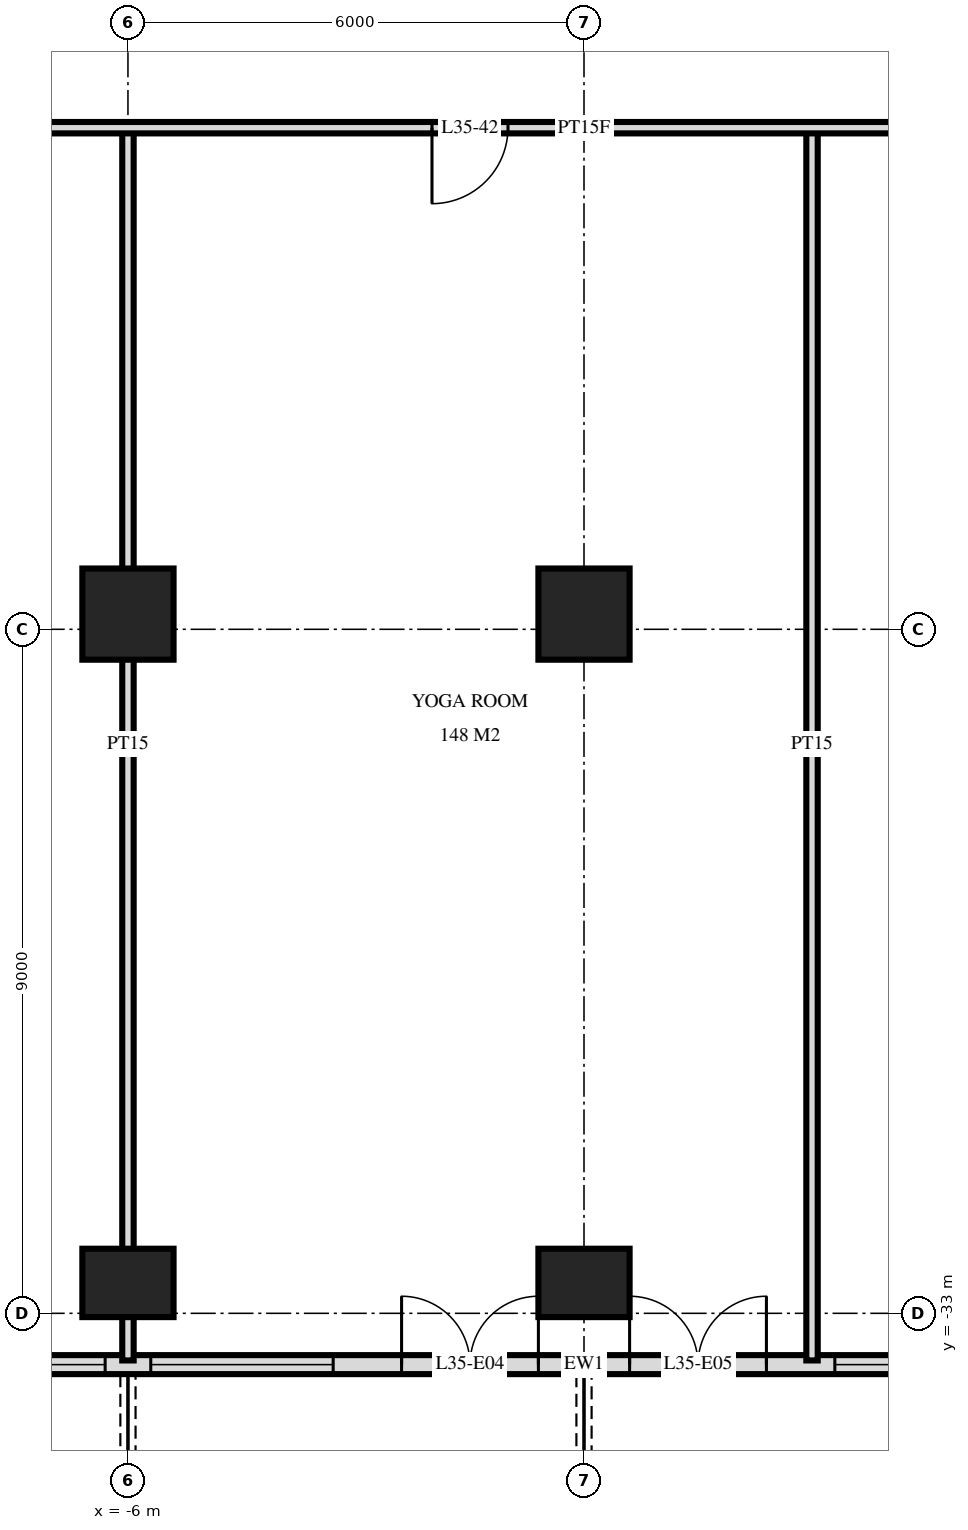
"""IFC4 building model, lengths in metres.
Left out: names, types, materials, properties, quantities, classifications, styles, units other than length and angle.
Written with IfcOpenShell. Run it as: python <this file> out.ifc"""

import sys

from ifc_helpers import new_model, si_unit, direction, frame, frame_2d, origin, origin_2d, place, context, subcontext, project, spatial, rectangle, extrude, element, fill, save


model = new_model("IFC4")
c1 = context("Model", 3, precision=1e-05, world=origin(), true_north=direction((0.0, 1.0)))
c2 = subcontext(c1, "Body", "Model", "MODEL_VIEW")
j1 = project(units=[si_unit("LENGTHUNIT", "METRE"), si_unit("PLANEANGLEUNIT", "RADIAN")], contexts=[c1])
p1 = place(None, origin())
s1 = spatial("IfcSite", under=j1, at=p1, CompositionType="ELEMENT")
p2 = place(p1, origin())
s2 = spatial("IfcBuilding", under=s1, at=p2, CompositionType="ELEMENT")
p3 = place(p2, frame((0.0, 0.0, 138.0)))
s3 = spatial("IfcBuildingStorey", under=s2, at=p3, CompositionType="ELEMENT", Elevation=138.0)
p4 = place(p3, frame((-6.0, -32.6, 0.0), z_axis=(0.0, 0.0, 1.0), x_axis=(1.0, 0.0, 0.0)))
e1 = element("IfcColumn", 1, at=p4, inside=s3, PredefinedType="COLUMN", context=c2, shape_type="SweptSolid", body=[
    extrude(rectangle(XDim=1.2, YDim=0.9, at=origin_2d()), origin(), (0.0, 0.0, 1.0), 3.6),
])
p5 = place(p3, frame((-6.0, -23.8, 0.0), z_axis=(0.0, 0.0, 1.0), x_axis=(1.0, 0.0, 0.0)))
e2 = element("IfcColumn", 2, at=p5, inside=s3, PredefinedType="COLUMN", context=c2, shape_type="SweptSolid", body=[
    extrude(rectangle(XDim=1.2, YDim=1.2, at=origin_2d()), origin(), (0.0, 0.0, 1.0), 3.6),
])
p6 = place(p3, frame((0.0, -32.6, 0.0), z_axis=(0.0, 0.0, 1.0), x_axis=(1.0, 0.0, 0.0)))
e3 = element("IfcColumn", 3, at=p6, inside=s3, PredefinedType="COLUMN", context=c2, shape_type="SweptSolid", body=[
    extrude(rectangle(XDim=1.2, YDim=0.9, at=origin_2d()), origin(), (0.0, 0.0, 1.0), 3.6),
])
p7 = place(p3, frame((0.0, -23.8, 0.0), z_axis=(0.0, 0.0, 1.0), x_axis=(1.0, 0.0, 0.0)))
e4 = element("IfcColumn", 4, at=p7, inside=s3, PredefinedType="COLUMN", context=c2, shape_type="SweptSolid", body=[
    extrude(rectangle(XDim=1.2, YDim=1.2, at=origin_2d()), origin(), (0.0, 0.0, 1.0), 3.6),
])
p8 = place(p3, frame((-23.675, -33.675, 0.0), z_axis=(0.0, 0.0, 1.0), x_axis=(1.0, 0.0, 0.0)))
e5 = element("IfcWall", 5, at=p8, inside=s3, PredefinedType="SOLIDWALL", context=c2, shape_type="SweptSolid", body=[
    extrude(rectangle(XDim=47.351, YDim=0.25, at=frame_2d((23.675, 0.0))), origin(), (0.0, 0.0, 1.0), 3.32),
])
p9 = place(p8, frame((0.575, 0.0, 0.0)))
e6 = element("IfcOpeningElement", 6, at=p9, cuts=e5, PredefinedType="OPENING", context=c2, shape_type="SweptSolid", body=[
    extrude(rectangle(XDim=1.8, YDim=2.4, at=frame_2d((0.9, 1.2))), frame((0.0, 0.135, 0.0), z_axis=(0.0, -1.0, 0.0), x_axis=(1.0, 0.0, 0.0)), (0.0, 0.0, 1.0), 0.27),
])
p10 = place(p8, frame((3.425, 0.0, 0.3)))
e7 = element("IfcOpeningElement", 7, at=p10, cuts=e5, PredefinedType="OPENING", context=c2, shape_type="SweptSolid", body=[
    extrude(rectangle(XDim=1.8, YDim=2.1, at=frame_2d((0.9, 1.05))), frame((0.0, 0.135, 0.0), z_axis=(0.0, -1.0, 0.0), x_axis=(1.0, 0.0, 0.0)), (0.0, 0.0, 1.0), 0.27),
])
p11 = place(p8, frame((5.975, 0.0, 0.3)))
e8 = element("IfcOpeningElement", 8, at=p11, cuts=e5, PredefinedType="OPENING", context=c2, shape_type="SweptSolid", body=[
    extrude(rectangle(XDim=2.4, YDim=2.1, at=frame_2d((1.2, 1.05))), frame((0.0, 0.135, 0.0), z_axis=(0.0, -1.0, 0.0), x_axis=(1.0, 0.0, 0.0)), (0.0, 0.0, 1.0), 0.27),
])
p12 = place(p8, frame((9.275, 0.0, 0.0)))
e9 = element("IfcOpeningElement", 9, at=p12, cuts=e5, PredefinedType="OPENING", context=c2, shape_type="SweptSolid", body=[
    extrude(rectangle(XDim=1.8, YDim=2.4, at=frame_2d((0.9, 1.2))), frame((0.0, 0.135, 0.0), z_axis=(0.0, -1.0, 0.0), x_axis=(1.0, 0.0, 0.0)), (0.0, 0.0, 1.0), 0.27),
])
p13 = place(p8, frame((12.275, 0.0, 0.0)))
e10 = element("IfcOpeningElement", 10, at=p13, cuts=e5, PredefinedType="OPENING", context=c2, shape_type="SweptSolid", body=[
    extrude(rectangle(XDim=1.8, YDim=2.4, at=frame_2d((0.9, 1.2))), frame((0.0, 0.135, 0.0), z_axis=(0.0, -1.0, 0.0), x_axis=(1.0, 0.0, 0.0)), (0.0, 0.0, 1.0), 0.27),
])
p14 = place(p8, frame((14.975, 0.0, 0.3)))
e11 = element("IfcOpeningElement", 11, at=p14, cuts=e5, PredefinedType="OPENING", context=c2, shape_type="SweptSolid", body=[
    extrude(rectangle(XDim=2.4, YDim=2.1, at=frame_2d((1.2, 1.05))), frame((0.0, 0.135, 0.0), z_axis=(0.0, -1.0, 0.0), x_axis=(1.0, 0.0, 0.0)), (0.0, 0.0, 1.0), 0.27),
])
p15 = place(p8, frame((17.975, 0.0, 0.3)))
e12 = element("IfcOpeningElement", 12, at=p15, cuts=e5, PredefinedType="OPENING", context=c2, shape_type="SweptSolid", body=[
    extrude(rectangle(XDim=2.4, YDim=2.1, at=frame_2d((1.2, 1.05))), frame((0.0, 0.135, 0.0), z_axis=(0.0, -1.0, 0.0), x_axis=(1.0, 0.0, 0.0)), (0.0, 0.0, 1.0), 0.27),
])
p16 = place(p8, frame((21.275, 0.0, 0.0)))
e13 = element("IfcOpeningElement", 13, at=p16, cuts=e5, PredefinedType="OPENING", context=c2, shape_type="SweptSolid", body=[
    extrude(rectangle(XDim=1.8, YDim=2.4, at=frame_2d((0.9, 1.2))), frame((0.0, 0.135, 0.0), z_axis=(0.0, -1.0, 0.0), x_axis=(1.0, 0.0, 0.0)), (0.0, 0.0, 1.0), 0.27),
])
p17 = place(p8, frame((24.275, 0.0, 0.0)))
e14 = element("IfcOpeningElement", 14, at=p17, cuts=e5, PredefinedType="OPENING", context=c2, shape_type="SweptSolid", body=[
    extrude(rectangle(XDim=1.8, YDim=2.4, at=frame_2d((0.9, 1.2))), frame((0.0, 0.135, 0.0), z_axis=(0.0, -1.0, 0.0), x_axis=(1.0, 0.0, 0.0)), (0.0, 0.0, 1.0), 0.27),
])
p18 = place(p8, frame((26.975, 0.0, 0.3)))
e15 = element("IfcOpeningElement", 15, at=p18, cuts=e5, PredefinedType="OPENING", context=c2, shape_type="SweptSolid", body=[
    extrude(rectangle(XDim=2.4, YDim=2.1, at=frame_2d((1.2, 1.05))), frame((0.0, 0.135, 0.0), z_axis=(0.0, -1.0, 0.0), x_axis=(1.0, 0.0, 0.0)), (0.0, 0.0, 1.0), 0.27),
])
p19 = place(p8, frame((30.275, 0.0, 0.0)))
e16 = element("IfcOpeningElement", 16, at=p19, cuts=e5, PredefinedType="OPENING", context=c2, shape_type="SweptSolid", body=[
    extrude(rectangle(XDim=1.8, YDim=2.4, at=frame_2d((0.9, 1.2))), frame((0.0, 0.135, 0.0), z_axis=(0.0, -1.0, 0.0), x_axis=(1.0, 0.0, 0.0)), (0.0, 0.0, 1.0), 0.27),
])
p20 = place(p8, frame((32.975, 0.0, 0.3)))
e17 = element("IfcOpeningElement", 17, at=p20, cuts=e5, PredefinedType="OPENING", context=c2, shape_type="SweptSolid", body=[
    extrude(rectangle(XDim=2.4, YDim=2.1, at=frame_2d((1.2, 1.05))), frame((0.0, 0.135, 0.0), z_axis=(0.0, -1.0, 0.0), x_axis=(1.0, 0.0, 0.0)), (0.0, 0.0, 1.0), 0.27),
])
p21 = place(p8, frame((36.275, 0.0, 0.0)))
e18 = element("IfcOpeningElement", 18, at=p21, cuts=e5, PredefinedType="OPENING", context=c2, shape_type="SweptSolid", body=[
    extrude(rectangle(XDim=1.8, YDim=2.4, at=frame_2d((0.9, 1.2))), frame((0.0, 0.135, 0.0), z_axis=(0.0, -1.0, 0.0), x_axis=(1.0, 0.0, 0.0)), (0.0, 0.0, 1.0), 0.27),
])
p22 = place(p8, frame((38.975, 0.0, 0.3)))
e19 = element("IfcOpeningElement", 19, at=p22, cuts=e5, PredefinedType="OPENING", context=c2, shape_type="SweptSolid", body=[
    extrude(rectangle(XDim=2.4, YDim=2.1, at=frame_2d((1.2, 1.05))), frame((0.0, 0.135, 0.0), z_axis=(0.0, -1.0, 0.0), x_axis=(1.0, 0.0, 0.0)), (0.0, 0.0, 1.0), 0.27),
])
p23 = place(p8, frame((42.275, 0.0, 0.0)))
e20 = element("IfcOpeningElement", 20, at=p23, cuts=e5, PredefinedType="OPENING", context=c2, shape_type="SweptSolid", body=[
    extrude(rectangle(XDim=1.8, YDim=2.4, at=frame_2d((0.9, 1.2))), frame((0.0, 0.135, 0.0), z_axis=(0.0, -1.0, 0.0), x_axis=(1.0, 0.0, 0.0)), (0.0, 0.0, 1.0), 0.27),
])
p24 = place(p8, frame((45.125, 0.0, 0.3)))
e21 = element("IfcOpeningElement", 21, at=p24, cuts=e5, PredefinedType="OPENING", context=c2, shape_type="SweptSolid", body=[
    extrude(rectangle(XDim=1.8, YDim=2.1, at=frame_2d((0.9, 1.05))), frame((0.0, 0.135, 0.0), z_axis=(0.0, -1.0, 0.0), x_axis=(1.0, 0.0, 0.0)), (0.0, 0.0, 1.0), 0.27),
])
for number, where, z_axis, x_axis in (
    (22, (3.0, -33.62, 0.0), (0.0, 0.0, 1.0), (0.0, 1.0, 0.0)),
    (23, (-6.0, -33.62, 0.0), (0.0, 0.0, 1.0), (0.0, 1.0, 0.0)),
):
    element("IfcWall", number, at=place(p3, frame(where, z_axis=z_axis, x_axis=x_axis)), inside=s3, PredefinedType="PARTITIONING", context=c2, shape_type="SweptSolid", body=[
        extrude(rectangle(XDim=16.22, YDim=0.15, at=frame_2d((8.11, 0.0))), origin(), (0.0, 0.0, 1.0), 3.32),
    ])
p25 = place(p3, frame((-28.02, -17.4, 0.0), z_axis=(0.0, 0.0, 1.0), x_axis=(1.0, 0.0, 0.0)))
e24 = element("IfcWall", 24, at=p25, inside=s3, PredefinedType="PARTITIONING", context=c2, shape_type="SweptSolid", body=[
    extrude(rectangle(XDim=56.04, YDim=0.15, at=frame_2d((28.02, 0.0))), origin(), (0.0, 0.0, 1.0), 3.32),
])
p26 = place(p25, frame((13.17, 0.0, 0.0)))
e25 = element("IfcOpeningElement", 25, at=p26, cuts=e24, PredefinedType="OPENING", context=c2, shape_type="SweptSolid", body=[
    extrude(rectangle(XDim=1.0, YDim=2.1, at=frame_2d((0.5, 1.05))), frame((0.0, 0.085, 0.0), z_axis=(0.0, -1.0, 0.0), x_axis=(1.0, 0.0, 0.0)), (0.0, 0.0, 1.0), 0.17),
])
p27 = place(p25, frame((11.87, 0.0, 0.0)))
e26 = element("IfcOpeningElement", 26, at=p27, cuts=e24, PredefinedType="OPENING", context=c2, shape_type="SweptSolid", body=[
    extrude(rectangle(XDim=1.0, YDim=2.1, at=frame_2d((0.5, 1.05))), frame((0.0, 0.085, 0.0), z_axis=(0.0, -1.0, 0.0), x_axis=(1.0, 0.0, 0.0)), (0.0, 0.0, 1.0), 0.17),
])
p28 = place(p25, frame((2.32, 0.0, 0.0)))
e27 = element("IfcOpeningElement", 27, at=p28, cuts=e24, PredefinedType="OPENING", context=c2, shape_type="SweptSolid", body=[
    extrude(rectangle(XDim=1.0, YDim=2.1, at=frame_2d((0.5, 1.05))), frame((0.0, 0.085, 0.0), z_axis=(0.0, -1.0, 0.0), x_axis=(1.0, 0.0, 0.0)), (0.0, 0.0, 1.0), 0.17),
])
p29 = place(p25, frame((40.17, 0.0, 0.0)))
e28 = element("IfcOpeningElement", 28, at=p29, cuts=e24, PredefinedType="OPENING", context=c2, shape_type="SweptSolid", body=[
    extrude(rectangle(XDim=1.0, YDim=2.1, at=frame_2d((0.5, 1.05))), frame((0.0, 0.085, 0.0), z_axis=(0.0, -1.0, 0.0), x_axis=(1.0, 0.0, 0.0)), (0.0, 0.0, 1.0), 0.17),
])
p30 = place(p25, frame((51.22, 0.0, 0.0)))
e29 = element("IfcOpeningElement", 29, at=p30, cuts=e24, PredefinedType="OPENING", context=c2, shape_type="SweptSolid", body=[
    extrude(rectangle(XDim=1.0, YDim=2.1, at=frame_2d((0.5, 1.05))), frame((0.0, 0.085, 0.0), z_axis=(0.0, -1.0, 0.0), x_axis=(1.0, 0.0, 0.0)), (0.0, 0.0, 1.0), 0.17),
])
p31 = place(p25, frame((18.52, 0.0, 0.0)))
e30 = element("IfcOpeningElement", 30, at=p31, cuts=e24, PredefinedType="OPENING", context=c2, shape_type="SweptSolid", body=[
    extrude(rectangle(XDim=1.0, YDim=2.1, at=frame_2d((0.5, 1.05))), frame((0.0, 0.085, 0.0), z_axis=(0.0, -1.0, 0.0), x_axis=(1.0, 0.0, 0.0)), (0.0, 0.0, 1.0), 0.17),
])
p32 = place(p25, frame((26.02, 0.0, 0.0)))
e31 = element("IfcOpeningElement", 31, at=p32, cuts=e24, PredefinedType="OPENING", context=c2, shape_type="SweptSolid", body=[
    extrude(rectangle(XDim=1.0, YDim=2.1, at=frame_2d((0.5, 1.05))), frame((0.0, 0.085, 0.0), z_axis=(0.0, -1.0, 0.0), x_axis=(1.0, 0.0, 0.0)), (0.0, 0.0, 1.0), 0.17),
])
p33 = place(p25, frame((35.02, 0.0, 0.0)))
e32 = element("IfcOpeningElement", 32, at=p33, cuts=e24, PredefinedType="OPENING", context=c2, shape_type="SweptSolid", body=[
    extrude(rectangle(XDim=1.0, YDim=2.1, at=frame_2d((0.5, 1.05))), frame((0.0, 0.085, 0.0), z_axis=(0.0, -1.0, 0.0), x_axis=(1.0, 0.0, 0.0)), (0.0, 0.0, 1.0), 0.17),
])
p34 = place(p14, origin())
e33 = element("IfcWindow", 33, at=p34, inside=s3, PartitioningType="SINGLE_PANEL", PredefinedType="WINDOW", context=c2, shape_type="SweptSolid", body=[
    extrude(rectangle(XDim=2.4, YDim=2.1, at=frame_2d((1.2, 1.05))), frame((0.0, 0.03, 0.0), z_axis=(0.0, -1.0, 0.0), x_axis=(1.0, 0.0, 0.0)), (0.0, 0.0, 1.0), 0.06),
])
fill(e11, e33)
p35 = place(p15, origin())
e34 = element("IfcWindow", 34, at=p35, inside=s3, PartitioningType="SINGLE_PANEL", PredefinedType="WINDOW", context=c2, shape_type="SweptSolid", body=[
    extrude(rectangle(XDim=2.4, YDim=2.1, at=frame_2d((1.2, 1.05))), frame((0.0, 0.03, 0.0), z_axis=(0.0, -1.0, 0.0), x_axis=(1.0, 0.0, 0.0)), (0.0, 0.0, 1.0), 0.06),
])
fill(e12, e34)
p36 = place(p16, origin())
e35 = element("IfcDoor", 35, at=p36, inside=s3, OperationType="DOUBLE_DOOR_SINGLE_SWING", PredefinedType="DOOR", context=c2, shape_type="SweptSolid", body=[
    extrude(rectangle(XDim=1.8, YDim=2.4, at=frame_2d((0.9, 1.2))), frame((0.0, 0.025, 0.0), z_axis=(0.0, -1.0, 0.0), x_axis=(1.0, 0.0, 0.0)), (0.0, 0.0, 1.0), 0.05),
])
fill(e13, e35)
p37 = place(p17, origin())
e36 = element("IfcDoor", 36, at=p37, inside=s3, OperationType="DOUBLE_DOOR_SINGLE_SWING", PredefinedType="DOOR", context=c2, shape_type="SweptSolid", body=[
    extrude(rectangle(XDim=1.8, YDim=2.4, at=frame_2d((0.9, 1.2))), frame((0.0, 0.025, 0.0), z_axis=(0.0, -1.0, 0.0), x_axis=(1.0, 0.0, 0.0)), (0.0, 0.0, 1.0), 0.05),
])
fill(e14, e36)
p38 = place(p18, origin())
e37 = element("IfcWindow", 37, at=p38, inside=s3, PartitioningType="SINGLE_PANEL", PredefinedType="WINDOW", context=c2, shape_type="SweptSolid", body=[
    extrude(rectangle(XDim=2.4, YDim=2.1, at=frame_2d((1.2, 1.05))), frame((0.0, 0.03, 0.0), z_axis=(0.0, -1.0, 0.0), x_axis=(1.0, 0.0, 0.0)), (0.0, 0.0, 1.0), 0.06),
])
fill(e15, e37)
p39 = place(p32, frame((0.5, 0.0, 0.0), z_axis=(0.0, 0.0, 1.0), x_axis=(-1.0, 0.0, 0.0)))
e38 = element("IfcDoor", 38, at=p39, inside=s3, OperationType="SINGLE_SWING_LEFT", PredefinedType="DOOR", context=c2, shape_type="SweptSolid", body=[
    extrude(rectangle(XDim=1.0, YDim=2.1, at=frame_2d((0.0, 1.05))), frame((0.0, -0.025, 0.0), z_axis=(0.0, 1.0, 0.0), x_axis=(-1.0, 0.0, 0.0)), (0.0, 0.0, 1.0), 0.05),
])
fill(e31, e38)
save(model, sys.argv[1])
